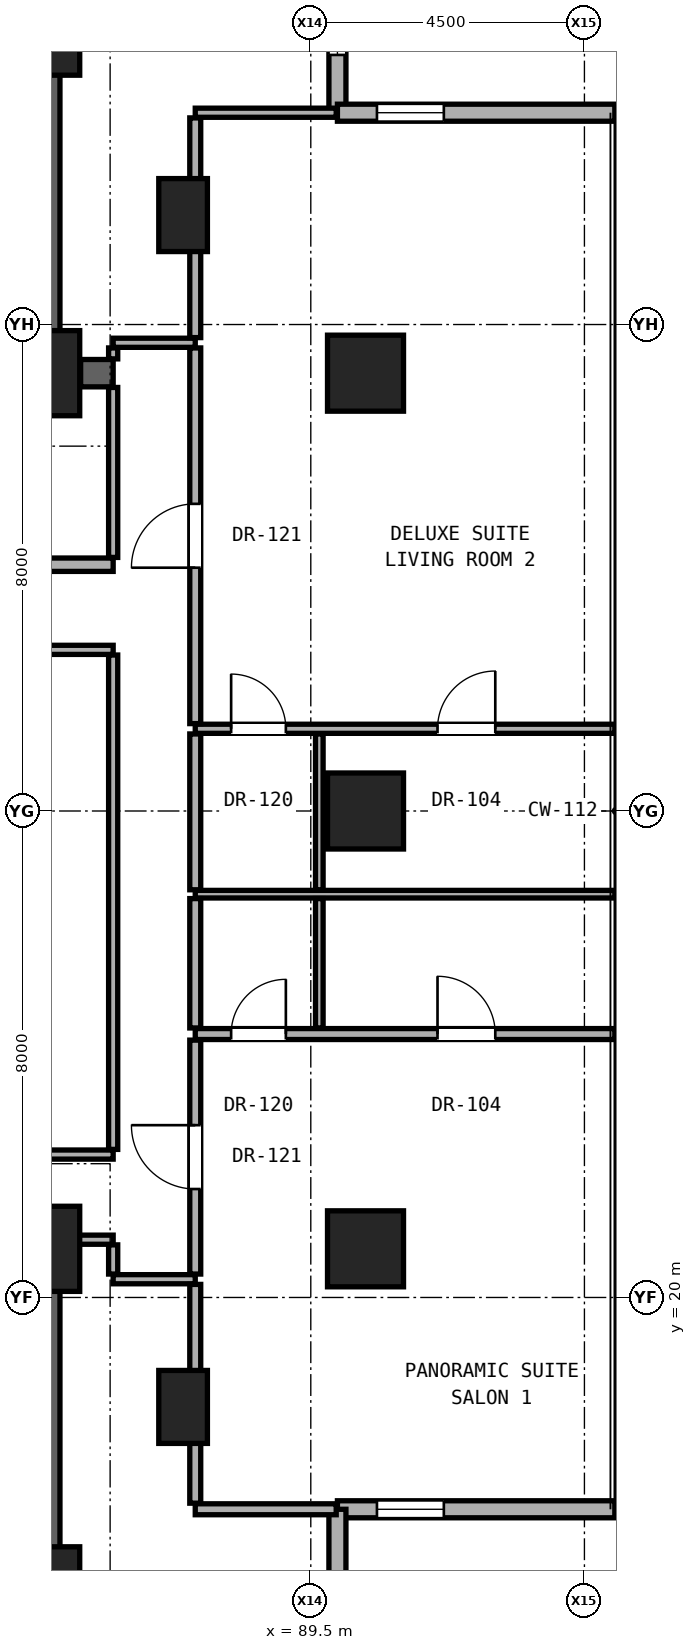
"""IFC4 building model, lengths in metres.
Left out: names, types, materials, properties, quantities, classifications, styles, units other than length and angle.
Written with IfcOpenShell. Run it as: python <this file> out.ifc"""

import sys

from ifc_helpers import new_model, si_unit, direction, frame, frame_2d, origin, origin_2d, place, context, subcontext, project, spatial, rectangle, hollow_rectangle, extrude, element, fill, save


model = new_model("IFC4")
c1 = context("Model", 3, precision=1e-05, world=origin(), true_north=direction((0.0, 1.0)))
c2 = subcontext(c1, "Body", "Model", "MODEL_VIEW")
j1 = project(units=[si_unit("LENGTHUNIT", "METRE"), si_unit("PLANEANGLEUNIT", "RADIAN")], contexts=[c1])
p1 = place(None, origin())
s1 = spatial("IfcSite", under=j1, at=p1, CompositionType="ELEMENT")
p2 = place(p1, origin())
s2 = spatial("IfcBuilding", under=s1, at=p2, CompositionType="ELEMENT")
p3 = place(p2, frame((0.0, 0.0, 25.7)))
s3 = spatial("IfcBuildingStorey", under=s2, at=p3, CompositionType="ELEMENT", Elevation=25.7)
for number, where, z_axis, x_axis in (
    (1, (85.0, 15.2, 0.0), (0.0, 0.0, 1.0), (1.0, 0.0, 0.0)),
    (2, (85.0, 20.8, 0.0), (0.0, 0.0, 1.0), (1.0, 0.0, 0.0)),
    (3, (85.0, 35.2, 0.0), (0.0, 0.0, 1.0), (1.0, 0.0, 0.0)),
    (4, (85.0, 40.8, 0.0), (0.0, 0.0, 1.0), (1.0, 0.0, 0.0)),
):
    element("IfcColumn", number, at=place(p3, frame(where, z_axis=z_axis, x_axis=x_axis)), inside=s3, PredefinedType="COLUMN", context=c2, shape_type="SweptSolid", body=[
        extrude(rectangle(XDim=1.4, YDim=1.4, at=origin_2d()), origin(), (0.0, 0.0, 1.0), 3.3),
    ])
for number, where, z_axis, x_axis in (
    (5, (90.4, 20.8, 0.0), (0.0, 0.0, 1.0), (1.0, 0.0, 0.0)),
    (6, (90.4, 28.0, 0.0), (0.0, 0.0, 1.0), (1.0, 0.0, 0.0)),
    (7, (90.4, 35.2, 0.0), (0.0, 0.0, 1.0), (1.0, 0.0, 0.0)),
):
    element("IfcColumn", number, at=place(p3, frame(where, z_axis=z_axis, x_axis=x_axis)), inside=s3, PredefinedType="COLUMN", context=c2, shape_type="SweptSolid", body=[
        extrude(hollow_rectangle(XDim=1.25, YDim=1.25, WallThickness=0.07, at=origin_2d()), origin(), (0.0, 0.0, 1.0), 3.3),
    ])
for number, where, z_axis, x_axis in (
    (8, (87.4, 18.2, 0.0), (0.0, 0.0, 1.0), (1.0, 0.0, 0.0)),
    (9, (87.4, 37.8, 0.0), (0.0, 0.0, 1.0), (1.0, 0.0, 0.0)),
):
    element("IfcColumn", number, at=place(p3, frame(where, z_axis=z_axis, x_axis=x_axis)), inside=s3, PredefinedType="PILASTER", context=c2, shape_type="SweptSolid", body=[
        extrude(rectangle(XDim=0.8, YDim=1.2, at=origin_2d()), origin(), (0.0, 0.0, 1.0), 3.3),
    ])
for number, where, z_axis, x_axis in (
    (10, (85.0, 35.2, 0.0), (0.0, 0.0, 1.0), (0.0, 1.0, 0.0)),
    (11, (85.0, 15.2, 0.0), (0.0, 0.0, 1.0), (0.0, 1.0, 0.0)),
):
    element("IfcWall", number, at=place(p3, frame(where, z_axis=z_axis, x_axis=x_axis)), inside=s3, PredefinedType="SHEAR", context=c2, shape_type="SweptSolid", body=[
        extrude(rectangle(XDim=5.6, YDim=0.75, at=frame_2d((2.8, 0.0))), origin(), (0.0, 0.0, 1.0), 3.06),
    ])
p4 = place(p3, frame((89.938, 39.483, 0.0), z_axis=(0.0, 0.0, 1.0), x_axis=(0.0, 1.0, 0.0)))
e12 = element("IfcWall", 12, at=p4, inside=s3, PredefinedType="SOLIDWALL", context=c2, shape_type="SweptSolid", body=[
    extrude(rectangle(XDim=4.58, YDim=0.28, at=frame_2d((2.29, 0.0))), origin(), (0.0, 0.0, 1.0), 3.04),
])
p5 = place(p4, frame((0.95, 0.0, 0.85)))
e13 = element("IfcOpeningElement", 13, at=p5, cuts=e12, PredefinedType="OPENING", context=c2, shape_type="SweptSolid", body=[
    extrude(rectangle(XDim=1.1, YDim=2.0, at=frame_2d((0.55, 1.0))), frame((0.0, 0.15, 0.0), z_axis=(0.0, -1.0, 0.0), x_axis=(1.0, 0.0, 0.0)), (0.0, 0.0, 1.0), 0.3),
])
p6 = place(p3, frame((89.938, 16.517, 0.0), z_axis=(0.0, 0.0, 1.0), x_axis=(1.0, 0.0, 0.0)))
e14 = element("IfcWall", 14, at=p6, inside=s3, PredefinedType="SOLIDWALL", context=c2, shape_type="SweptSolid", body=[
    extrude(rectangle(XDim=4.58, YDim=0.28, at=frame_2d((2.29, 0.0))), origin(), (0.0, 0.0, 1.0), 3.04),
])
p7 = place(p6, frame((0.65, 0.0, 0.85)))
e15 = element("IfcOpeningElement", 15, at=p7, cuts=e14, PredefinedType="OPENING", context=c2, shape_type="SweptSolid", body=[
    extrude(rectangle(XDim=1.1, YDim=2.0, at=frame_2d((0.55, 1.0))), frame((0.0, 0.15, 0.0), z_axis=(0.0, -1.0, 0.0), x_axis=(1.0, 0.0, 0.0)), (0.0, 0.0, 1.0), 0.3),
])
p8 = place(p3, frame((89.938, 11.937, 0.0), z_axis=(0.0, 0.0, 1.0), x_axis=(0.0, 1.0, 0.0)))
e16 = element("IfcWall", 16, at=p8, inside=s3, PredefinedType="SOLIDWALL", context=c2, shape_type="SweptSolid", body=[
    extrude(rectangle(XDim=4.58, YDim=0.28, at=frame_2d((2.29, 0.0))), origin(), (0.0, 0.0, 1.0), 3.04),
])
p9 = place(p3, frame((94.518, 39.483, 0.0), z_axis=(0.0, 0.0, 1.0), x_axis=(-1.0, 0.0, 0.0)))
e17 = element("IfcWall", 17, at=p9, inside=s3, PredefinedType="SOLIDWALL", context=c2, shape_type="SweptSolid", body=[
    extrude(rectangle(XDim=4.58, YDim=0.28, at=frame_2d((2.29, 0.0))), origin(), (0.0, 0.0, 1.0), 3.04),
])
p10 = place(p9, frame((2.83, 0.0, 0.85)))
e18 = element("IfcOpeningElement", 18, at=p10, cuts=e17, PredefinedType="OPENING", context=c2, shape_type="SweptSolid", body=[
    extrude(rectangle(XDim=1.1, YDim=2.0, at=frame_2d((0.55, 1.0))), frame((0.0, 0.15, 0.0), z_axis=(0.0, -1.0, 0.0), x_axis=(1.0, 0.0, 0.0)), (0.0, 0.0, 1.0), 0.3),
])
p11 = place(p3, frame((87.6, 16.517, 0.0), z_axis=(0.0, 0.0, 1.0), x_axis=(1.0, 0.0, 0.0)))
e19 = element("IfcWall", 19, at=p11, inside=s3, PredefinedType="PARTITIONING", context=c2, shape_type="SweptSolid", body=[
    extrude(rectangle(XDim=2.318, YDim=0.18, at=frame_2d((1.159, 0.0))), origin(), (0.0, 0.0, 1.0), 3.06),
])
p12 = place(p3, frame((86.25, 20.3, 0.0), z_axis=(0.0, 0.0, 1.0), x_axis=(1.0, 0.0, 0.0)))
e20 = element("IfcWall", 20, at=p12, inside=s3, PredefinedType="PARTITIONING", context=c2, shape_type="SweptSolid", body=[
    extrude(rectangle(XDim=1.35, YDim=0.15, at=frame_2d((0.675, 0.0))), origin(), (0.0, 0.0, 1.0), 3.06),
])
p13 = place(p3, frame((85.37, 20.95, 0.0), z_axis=(0.0, 0.0, 1.0), x_axis=(1.0, 0.0, 0.0)))
e21 = element("IfcWall", 21, at=p13, inside=s3, PredefinedType="PARTITIONING", context=c2, shape_type="SweptSolid", body=[
    extrude(rectangle(XDim=0.88, YDim=0.15, at=frame_2d((0.44, 0.0))), origin(), (0.0, 0.0, 1.0), 2.452),
])
p14 = place(p3, frame((66.62, 22.35, 0.0), z_axis=(0.0, 0.0, 1.0), x_axis=(1.0, 0.0, 0.0)))
e22 = element("IfcWall", 22, at=p14, inside=s3, PredefinedType="PARTITIONING", context=c2, shape_type="SweptSolid", body=[
    extrude(rectangle(XDim=19.63, YDim=0.15, at=frame_2d((9.815, 0.0))), origin(), (0.0, 0.0, 1.0), 2.125),
])
p15 = place(p14, frame((8.129, 0.0, 0.0)))
e23 = element("IfcOpeningElement", 23, at=p15, cuts=e22, PredefinedType="OPENING", context=c2, shape_type="SweptSolid", body=[
    extrude(rectangle(XDim=0.85, YDim=2.01, at=frame_2d((0.425, 1.005))), frame((0.0, 0.085, 0.0), z_axis=(0.0, -1.0, 0.0), x_axis=(1.0, 0.0, 0.0)), (0.0, 0.0, 1.0), 0.17),
])
p16 = place(p3, frame((87.6, 24.332, 0.0), z_axis=(0.0, 0.0, 1.0), x_axis=(1.0, 0.0, 0.0)))
e24 = element("IfcWall", 24, at=p16, inside=s3, PredefinedType="PARTITIONING", context=c2, shape_type="SweptSolid", body=[
    extrude(rectangle(XDim=6.918, YDim=0.18, at=frame_2d((3.459, 0.0))), origin(), (0.0, 0.0, 1.0), 2.196),
])
p17 = place(p16, frame((3.984, 0.0, 0.0)))
e25 = element("IfcOpeningElement", 25, at=p17, cuts=e24, PredefinedType="OPENING", context=c2, shape_type="SweptSolid", body=[
    extrude(rectangle(XDim=0.95, YDim=2.15, at=frame_2d((0.475, 1.075))), frame((0.0, 0.1, 0.0), z_axis=(0.0, -1.0, 0.0), x_axis=(1.0, 0.0, 0.0)), (0.0, 0.0, 1.0), 0.2),
])
p18 = place(p16, frame((0.59, 0.0, 0.0)))
e26 = element("IfcOpeningElement", 26, at=p18, cuts=e24, PredefinedType="OPENING", context=c2, shape_type="SweptSolid", body=[
    extrude(rectangle(XDim=0.9, YDim=2.1, at=frame_2d((0.45, 1.05))), frame((0.0, 0.1, 0.0), z_axis=(0.0, -1.0, 0.0), x_axis=(1.0, 0.0, 0.0)), (0.0, 0.0, 1.0), 0.2),
])
p19 = place(p3, frame((87.6, 26.632, 0.0), z_axis=(0.0, 0.0, 1.0), x_axis=(1.0, 0.0, 0.0)))
e27 = element("IfcWall", 27, at=p19, inside=s3, PredefinedType="PARTITIONING", context=c2, shape_type="SweptSolid", body=[
    extrude(rectangle(XDim=6.918, YDim=0.125, at=frame_2d((3.459, 0.0))), origin(), (0.0, 0.0, 1.0), 2.196),
])
p20 = place(p3, frame((87.6, 29.352, 0.0), z_axis=(0.0, 0.0, 1.0), x_axis=(1.0, 0.0, 0.0)))
e28 = element("IfcWall", 28, at=p20, inside=s3, PredefinedType="PARTITIONING", context=c2, shape_type="SweptSolid", body=[
    extrude(rectangle(XDim=6.918, YDim=0.15, at=frame_2d((3.459, 0.0))), origin(), (0.0, 0.0, 1.0), 2.196),
])
p21 = place(p20, frame((3.984, 0.0, 0.0)))
e29 = element("IfcOpeningElement", 29, at=p21, cuts=e28, PredefinedType="OPENING", context=c2, shape_type="SweptSolid", body=[
    extrude(rectangle(XDim=0.95, YDim=2.15, at=frame_2d((0.475, 1.075))), frame((0.0, 0.085, 0.0), z_axis=(0.0, -1.0, 0.0), x_axis=(1.0, 0.0, 0.0)), (0.0, 0.0, 1.0), 0.17),
])
p22 = place(p20, frame((0.59, 0.0, 0.0)))
e30 = element("IfcOpeningElement", 30, at=p22, cuts=e28, PredefinedType="OPENING", context=c2, shape_type="SweptSolid", body=[
    extrude(rectangle(XDim=0.9, YDim=2.1, at=frame_2d((0.45, 1.05))), frame((0.0, 0.085, 0.0), z_axis=(0.0, -1.0, 0.0), x_axis=(1.0, 0.0, 0.0)), (0.0, 0.0, 1.0), 0.17),
])
p23 = place(p3, frame((66.62, 30.65, 0.0), z_axis=(0.0, 0.0, 1.0), x_axis=(1.0, 0.0, 0.0)))
e31 = element("IfcWall", 31, at=p23, inside=s3, PredefinedType="PARTITIONING", context=c2, shape_type="SweptSolid", body=[
    extrude(rectangle(XDim=19.63, YDim=0.15, at=frame_2d((9.815, 0.0))), origin(), (0.0, 0.0, 1.0), 2.125),
])
p24 = place(p23, frame((3.855, 0.0, 0.0)))
e32 = element("IfcOpeningElement", 32, at=p24, cuts=e31, PredefinedType="OPENING", context=c2, shape_type="SweptSolid", body=[
    extrude(rectangle(XDim=0.85, YDim=2.01, at=frame_2d((0.425, 1.005))), frame((0.0, 0.085, 0.0), z_axis=(0.0, -1.0, 0.0), x_axis=(1.0, 0.0, 0.0)), (0.0, 0.0, 1.0), 0.17),
])
p25 = place(p23, frame((15.209, 0.0, 0.0)))
e33 = element("IfcOpeningElement", 33, at=p25, cuts=e31, PredefinedType="OPENING", context=c2, shape_type="SweptSolid", body=[
    extrude(rectangle(XDim=0.85, YDim=2.01, at=frame_2d((0.425, 1.005))), frame((0.0, 0.085, 0.0), z_axis=(0.0, -1.0, 0.0), x_axis=(1.0, 0.0, 0.0)), (0.0, 0.0, 1.0), 0.17),
])
p26 = place(p3, frame((71.55, 32.05, 0.0), z_axis=(0.0, 0.0, 1.0), x_axis=(1.0, 0.0, 0.0)))
e34 = element("IfcWall", 34, at=p26, inside=s3, PredefinedType="SOLIDWALL", context=c2, shape_type="SweptSolid", body=[
    extrude(rectangle(XDim=14.7, YDim=0.22, at=frame_2d((7.35, 0.0))), origin(), (0.0, 0.0, 1.0), 2.125),
])
p27 = place(p26, frame((11.39, 0.0, 0.0)))
e35 = element("IfcOpeningElement", 35, at=p27, cuts=e34, PredefinedType="OPENING", context=c2, shape_type="SweptSolid", body=[
    extrude(rectangle(XDim=0.85, YDim=2.01, at=frame_2d((0.425, 1.005))), frame((0.0, 0.12, 0.0), z_axis=(0.0, -1.0, 0.0), x_axis=(1.0, 0.0, 0.0)), (0.0, 0.0, 1.0), 0.24),
])
p28 = place(p26, frame((6.065, 0.0, 0.0)))
e36 = element("IfcOpeningElement", 36, at=p28, cuts=e34, PredefinedType="OPENING", context=c2, shape_type="SweptSolid", body=[
    extrude(rectangle(XDim=0.85, YDim=2.01, at=frame_2d((0.425, 1.005))), frame((0.0, 0.12, 0.0), z_axis=(0.0, -1.0, 0.0), x_axis=(1.0, 0.0, 0.0)), (0.0, 0.0, 1.0), 0.24),
])
p29 = place(p26, frame((0.7, 0.0, 0.0)))
e37 = element("IfcOpeningElement", 37, at=p29, cuts=e34, PredefinedType="OPENING", context=c2, shape_type="SweptSolid", body=[
    extrude(rectangle(XDim=0.85, YDim=2.01, at=frame_2d((0.425, 1.005))), frame((0.0, 0.12, 0.0), z_axis=(0.0, -1.0, 0.0), x_axis=(1.0, 0.0, 0.0)), (0.0, 0.0, 1.0), 0.24),
])
p30 = place(p26, frame((2.55, 0.0, 0.0)))
e38 = element("IfcOpeningElement", 38, at=p30, cuts=e34, PredefinedType="OPENING", context=c2, shape_type="SweptSolid", body=[
    extrude(rectangle(XDim=0.85, YDim=2.01, at=frame_2d((0.425, 1.005))), frame((0.0, 0.12, 0.0), z_axis=(0.0, -1.0, 0.0), x_axis=(1.0, 0.0, 0.0)), (0.0, 0.0, 1.0), 0.24),
])
p31 = place(p3, frame((85.715, 35.2, 0.0), z_axis=(0.0, 0.0, 1.0), x_axis=(1.0, 0.0, 0.0)))
e39 = element("IfcWall", 39, at=p31, inside=s3, PredefinedType="SHEAR", context=c2, shape_type="SweptSolid", body=[
    extrude(rectangle(XDim=0.535, YDim=0.45, at=frame_2d((0.268, 0.0))), origin(), (0.0, 0.0, 1.0), 3.06),
])
p32 = place(p3, frame((86.25, 35.7, 0.0), z_axis=(0.0, 0.0, 1.0), x_axis=(1.0, 0.0, 0.0)))
e40 = element("IfcWall", 40, at=p32, inside=s3, PredefinedType="PARTITIONING", context=c2, shape_type="SweptSolid", body=[
    extrude(rectangle(XDim=1.35, YDim=0.15, at=frame_2d((0.675, 0.0))), origin(), (0.0, 0.0, 1.0), 3.06),
])
p33 = place(p3, frame((87.6, 39.483, 0.0), z_axis=(0.0, 0.0, 1.0), x_axis=(1.0, 0.0, 0.0)))
e41 = element("IfcWall", 41, at=p33, inside=s3, PredefinedType="PARTITIONING", context=c2, shape_type="SweptSolid", body=[
    extrude(rectangle(XDim=2.318, YDim=0.15, at=frame_2d((1.159, 0.0))), origin(), (0.0, 0.0, 1.0), 3.06),
])
p34 = place(p3, frame((86.25, 20.385, 0.0), z_axis=(0.0, 0.0, 1.0), x_axis=(0.0, 1.0, 0.0)))
e42 = element("IfcWall", 42, at=p34, inside=s3, PredefinedType="PARTITIONING", context=c2, shape_type="SweptSolid", body=[
    extrude(rectangle(XDim=0.48, YDim=0.15, at=frame_2d((0.24, 0.0))), origin(), (0.0, 0.0, 1.0), 2.452),
])
p35 = place(p3, frame((86.25, 22.435, 0.0), z_axis=(0.0, 0.0, 1.0), x_axis=(0.0, 1.0, 0.0)))
e43 = element("IfcWall", 43, at=p35, inside=s3, PredefinedType="PARTITIONING", context=c2, shape_type="SweptSolid", body=[
    extrude(rectangle(XDim=8.13, YDim=0.15, at=frame_2d((4.065, 0.0))), origin(), (0.0, 0.0, 1.0), 2.279),
])
p36 = place(p3, frame((86.25, 32.17, 0.0), z_axis=(0.0, 0.0, 1.0), x_axis=(0.0, 1.0, 0.0)))
e44 = element("IfcWall", 44, at=p36, inside=s3, PredefinedType="PARTITIONING", context=c2, shape_type="SweptSolid", body=[
    extrude(rectangle(XDim=2.795, YDim=0.15, at=frame_2d((1.397, 0.0))), origin(), (0.0, 0.0, 1.0), 2.452),
])
p37 = place(p3, frame((86.25, 35.435, 0.0), z_axis=(0.0, 0.0, 1.0), x_axis=(0.0, 1.0, 0.0)))
e45 = element("IfcWall", 45, at=p37, inside=s3, PredefinedType="PARTITIONING", context=c2, shape_type="SweptSolid", body=[
    extrude(rectangle(XDim=0.18, YDim=0.15, at=frame_2d((0.09, 0.0))), origin(), (0.0, 0.0, 1.0), 2.452),
])
p38 = place(p3, frame((87.6, 16.617, 0.0), z_axis=(0.0, 0.0, 1.0), x_axis=(0.0, 1.0, 0.0)))
e46 = element("IfcWall", 46, at=p38, inside=s3, PredefinedType="PARTITIONING", context=c2, shape_type="SweptSolid", body=[
    extrude(rectangle(XDim=3.598, YDim=0.18, at=frame_2d((1.799, 0.0))), origin(), (0.0, 0.0, 1.0), 2.436),
])
p39 = place(p3, frame((87.6, 20.385, 0.0), z_axis=(0.0, 0.0, 1.0), x_axis=(0.0, 1.0, 0.0)))
e47 = element("IfcWall", 47, at=p39, inside=s3, PredefinedType="PARTITIONING", context=c2, shape_type="SweptSolid", body=[
    extrude(rectangle(XDim=3.847, YDim=0.18, at=frame_2d((1.923, 0.0))), origin(), (0.0, 0.0, 1.0), 2.452),
])
p40 = place(p39, frame((1.398, 0.0, 0.0)))
e48 = element("IfcOpeningElement", 48, at=p40, cuts=e47, PredefinedType="OPENING", context=c2, shape_type="SweptSolid", body=[
    extrude(rectangle(XDim=1.05, YDim=2.2, at=frame_2d((0.525, 1.1))), frame((0.0, 0.1, 0.0), z_axis=(0.0, -1.0, 0.0), x_axis=(1.0, 0.0, 0.0)), (0.0, 0.0, 1.0), 0.2),
])
p41 = place(p3, frame((87.6, 24.432, 0.0), z_axis=(0.0, 0.0, 1.0), x_axis=(0.0, 1.0, 0.0)))
e49 = element("IfcWall", 49, at=p41, inside=s3, PredefinedType="PARTITIONING", context=c2, shape_type="SweptSolid", body=[
    extrude(rectangle(XDim=2.128, YDim=0.18, at=frame_2d((1.064, 0.0))), origin(), (0.0, 0.0, 1.0), 3.06),
])
p42 = place(p3, frame((87.6, 26.705, 0.0), z_axis=(0.0, 0.0, 1.0), x_axis=(0.0, 1.0, 0.0)))
e50 = element("IfcWall", 50, at=p42, inside=s3, PredefinedType="PARTITIONING", context=c2, shape_type="SweptSolid", body=[
    extrude(rectangle(XDim=2.562, YDim=0.18, at=frame_2d((1.281, 0.0))), origin(), (0.0, 0.0, 1.0), 2.279),
])
p43 = place(p3, frame((87.6, 29.437, 0.0), z_axis=(0.0, 0.0, 1.0), x_axis=(0.0, 1.0, 0.0)))
e51 = element("IfcWall", 51, at=p43, inside=s3, PredefinedType="PARTITIONING", context=c2, shape_type="SweptSolid", body=[
    extrude(rectangle(XDim=6.178, YDim=0.18, at=frame_2d((3.089, 0.0))), origin(), (0.0, 0.0, 1.0), 2.452),
])
p44 = place(p43, frame((2.564, 0.0, 0.0)))
e52 = element("IfcOpeningElement", 52, at=p44, cuts=e51, PredefinedType="OPENING", context=c2, shape_type="SweptSolid", body=[
    extrude(rectangle(XDim=1.05, YDim=2.2, at=frame_2d((0.525, 1.1))), frame((0.0, 0.1, 0.0), z_axis=(0.0, -1.0, 0.0), x_axis=(1.0, 0.0, 0.0)), (0.0, 0.0, 1.0), 0.2),
])
p45 = place(p3, frame((87.6, 35.785, 0.0), z_axis=(0.0, 0.0, 1.0), x_axis=(0.0, 1.0, 0.0)))
e53 = element("IfcWall", 53, at=p45, inside=s3, PredefinedType="PARTITIONING", context=c2, shape_type="SweptSolid", body=[
    extrude(rectangle(XDim=3.613, YDim=0.18, at=frame_2d((1.807, 0.0))), origin(), (0.0, 0.0, 1.0), 2.436),
])
p46 = place(p3, frame((89.64, 24.432, 0.0), z_axis=(0.0, 0.0, 1.0), x_axis=(0.0, 1.0, 0.0)))
e54 = element("IfcWall", 54, at=p46, inside=s3, PredefinedType="PARTITIONING", context=c2, shape_type="SweptSolid", body=[
    extrude(rectangle(XDim=2.128, YDim=0.125, at=frame_2d((1.064, 0.0))), origin(), (0.0, 0.0, 1.0), 3.06),
])
p47 = place(p3, frame((89.64, 26.705, 0.0), z_axis=(0.0, 0.0, 1.0), x_axis=(0.0, 1.0, 0.0)))
e55 = element("IfcWall", 55, at=p47, inside=s3, PredefinedType="PARTITIONING", context=c2, shape_type="SweptSolid", body=[
    extrude(rectangle(XDim=2.562, YDim=0.125, at=frame_2d((1.281, 0.0))), origin(), (0.0, 0.0, 1.0), 2.279),
])
p48 = place(p5, origin())
e56 = element("IfcWindow", 56, at=p48, inside=s3, PartitioningType="SINGLE_PANEL", PredefinedType="WINDOW", context=c2, shape_type="SweptSolid", body=[
    extrude(rectangle(XDim=1.1, YDim=2.0, at=frame_2d((0.55, 1.0))), frame((0.0, 0.03, 0.0), z_axis=(0.0, -1.0, 0.0), x_axis=(1.0, 0.0, 0.0)), (0.0, 0.0, 1.0), 0.06),
])
fill(e13, e56)
p49 = place(p7, origin())
e57 = element("IfcWindow", 57, at=p49, inside=s3, PartitioningType="SINGLE_PANEL", PredefinedType="WINDOW", context=c2, shape_type="SweptSolid", body=[
    extrude(rectangle(XDim=1.1, YDim=2.0, at=frame_2d((0.55, 1.0))), frame((0.0, 0.03, 0.0), z_axis=(0.0, -1.0, 0.0), x_axis=(1.0, 0.0, 0.0)), (0.0, 0.0, 1.0), 0.06),
])
fill(e15, e57)
p50 = place(p10, origin())
e58 = element("IfcWindow", 58, at=p50, inside=s3, PartitioningType="SINGLE_PANEL", PredefinedType="WINDOW", context=c2, shape_type="SweptSolid", body=[
    extrude(rectangle(XDim=1.1, YDim=2.0, at=frame_2d((0.55, 1.0))), frame((0.0, 0.03, 0.0), z_axis=(0.0, -1.0, 0.0), x_axis=(1.0, 0.0, 0.0)), (0.0, 0.0, 1.0), 0.06),
])
fill(e18, e58)
p51 = place(p40, origin())
e59 = element("IfcDoor", 59, at=p51, inside=s3, OperationType="SINGLE_SWING_RIGHT", PredefinedType="DOOR", context=c2, shape_type="SweptSolid", body=[
    extrude(rectangle(XDim=1.05, YDim=2.2, at=frame_2d((0.525, 1.1))), frame((0.0, 0.025, 0.0), z_axis=(0.0, -1.0, 0.0), x_axis=(1.0, 0.0, 0.0)), (0.0, 0.0, 1.0), 0.05),
])
fill(e48, e59)
p52 = place(p17, origin())
e60 = element("IfcDoor", 60, at=p52, inside=s3, OperationType="SINGLE_SWING_LEFT", PredefinedType="DOOR", context=c2, shape_type="SweptSolid", body=[
    extrude(rectangle(XDim=0.95, YDim=2.15, at=frame_2d((0.475, 1.075))), frame((0.0, 0.025, 0.0), z_axis=(0.0, -1.0, 0.0), x_axis=(1.0, 0.0, 0.0)), (0.0, 0.0, 1.0), 0.05),
])
fill(e25, e60)
p53 = place(p18, origin())
e61 = element("IfcDoor", 61, at=p53, inside=s3, OperationType="SINGLE_SWING_RIGHT", PredefinedType="DOOR", context=c2, shape_type="SweptSolid", body=[
    extrude(rectangle(XDim=0.9, YDim=2.1, at=frame_2d((0.45, 1.05))), frame((0.0, 0.025, 0.0), z_axis=(0.0, -1.0, 0.0), x_axis=(1.0, 0.0, 0.0)), (0.0, 0.0, 1.0), 0.05),
])
fill(e26, e61)
p54 = place(p44, origin())
e62 = element("IfcDoor", 62, at=p54, inside=s3, OperationType="SINGLE_SWING_LEFT", PredefinedType="DOOR", context=c2, shape_type="SweptSolid", body=[
    extrude(rectangle(XDim=1.05, YDim=2.2, at=frame_2d((0.525, 1.1))), frame((0.0, 0.025, 0.0), z_axis=(0.0, -1.0, 0.0), x_axis=(1.0, 0.0, 0.0)), (0.0, 0.0, 1.0), 0.05),
])
fill(e52, e62)
p55 = place(p21, origin())
e63 = element("IfcDoor", 63, at=p55, inside=s3, OperationType="SINGLE_SWING_RIGHT", PredefinedType="DOOR", context=c2, shape_type="SweptSolid", body=[
    extrude(rectangle(XDim=0.95, YDim=2.15, at=frame_2d((0.475, 1.075))), frame((0.0, 0.025, 0.0), z_axis=(0.0, -1.0, 0.0), x_axis=(1.0, 0.0, 0.0)), (0.0, 0.0, 1.0), 0.05),
])
fill(e29, e63)
p56 = place(p22, origin())
e64 = element("IfcDoor", 64, at=p56, inside=s3, OperationType="SINGLE_SWING_LEFT", PredefinedType="DOOR", context=c2, shape_type="SweptSolid", body=[
    extrude(rectangle(XDim=0.9, YDim=2.1, at=frame_2d((0.45, 1.05))), frame((0.0, 0.025, 0.0), z_axis=(0.0, -1.0, 0.0), x_axis=(1.0, 0.0, 0.0)), (0.0, 0.0, 1.0), 0.05),
])
fill(e30, e64)
save(model, sys.argv[1])
